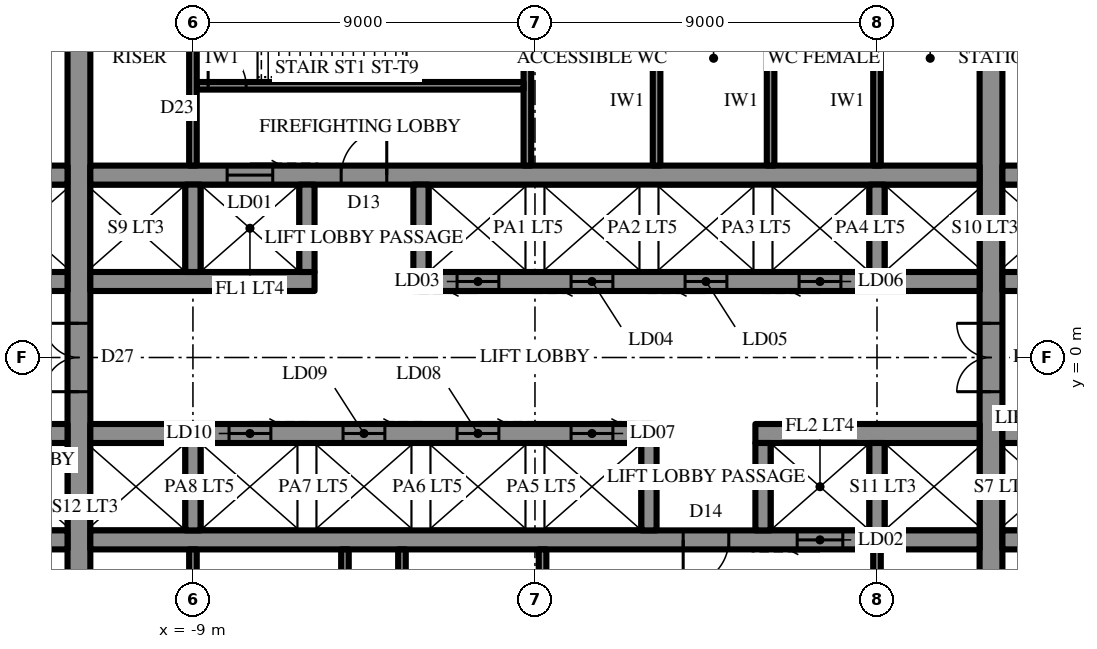
"""IFC4 building model, lengths in metres.
Left out: names, types, materials, properties, quantities, classifications, styles, units other than length and angle.
Written with IfcOpenShell. Run it as: python <this file> out.ifc"""

import sys

from ifc_helpers import new_model, si_unit, direction, frame, frame_2d, origin, place, context, subcontext, project, spatial, rectangle, extrude, element, fill, save


model = new_model("IFC4")
c1 = context("Model", 3, precision=1e-05, world=origin(), true_north=direction((0.0, 1.0)))
c2 = subcontext(c1, "Body", "Model", "MODEL_VIEW")
j1 = project(units=[si_unit("LENGTHUNIT", "METRE"), si_unit("PLANEANGLEUNIT", "RADIAN")], contexts=[c1])
p1 = place(None, origin())
s1 = spatial("IfcSite", under=j1, at=p1, CompositionType="ELEMENT")
p2 = place(p1, origin())
s2 = spatial("IfcBuilding", under=s1, at=p2, CompositionType="ELEMENT")
p3 = place(p2, frame((0.0, 0.0, 18.5)))
s3 = spatial("IfcBuildingStorey", under=s2, at=p3, CompositionType="ELEMENT", Elevation=18.5)
p4 = place(p3, frame((12.0, -10.7, 0.0), z_axis=(0.0, 0.0, 1.0), x_axis=(0.0, 1.0, 0.0)))
e1 = element("IfcWall", 1, at=p4, inside=s3, PredefinedType="SHEAR", context=c2, shape_type="SweptSolid", body=[
    extrude(rectangle(XDim=21.4, YDim=0.6, at=frame_2d((10.7, 0.0))), origin(), (0.0, 0.0, 1.0), 5.0),
])
p5 = place(p4, frame((9.8, 0.0, 0.0)))
e2 = element("IfcOpeningElement", 2, at=p5, cuts=e1, PredefinedType="OPENING", context=c2, shape_type="SweptSolid", body=[
    extrude(rectangle(XDim=1.8, YDim=2.4, at=frame_2d((0.9, 1.2))), frame((0.0, 0.31, 0.0), z_axis=(0.0, -1.0, 0.0), x_axis=(1.0, 0.0, 0.0)), (0.0, 0.0, 1.0), 0.62),
])
p6 = place(p3, frame((-12.0, -10.7, 0.0), z_axis=(0.0, 0.0, 1.0), x_axis=(0.0, 1.0, 0.0)))
e3 = element("IfcWall", 3, at=p6, inside=s3, PredefinedType="SHEAR", context=c2, shape_type="SweptSolid", body=[
    extrude(rectangle(XDim=21.4, YDim=0.6, at=frame_2d((10.7, 0.0))), origin(), (0.0, 0.0, 1.0), 5.0),
])
p7 = place(p6, frame((9.8, 0.0, 0.0)))
e4 = element("IfcOpeningElement", 4, at=p7, cuts=e3, PredefinedType="OPENING", context=c2, shape_type="SweptSolid", body=[
    extrude(rectangle(XDim=1.8, YDim=2.4, at=frame_2d((0.9, 1.2))), frame((0.0, 0.31, 0.0), z_axis=(0.0, -1.0, 0.0), x_axis=(1.0, 0.0, 0.0)), (0.0, 0.0, 1.0), 0.62),
])
p8 = place(p3, frame((-14.8, 2.0, 0.0), z_axis=(0.0, 0.0, 1.0), x_axis=(1.0, 0.0, 0.0)))
e5 = element("IfcWall", 5, at=p8, inside=s3, PredefinedType="SHEAR", context=c2, shape_type="SweptSolid", body=[
    extrude(rectangle(XDim=2.5, YDim=0.5, at=frame_2d((1.25, 0.0))), origin(), (0.0, 0.0, 1.0), 5.0),
])
p9 = place(p3, frame((-11.7, 2.0, 0.0), z_axis=(0.0, 0.0, 1.0), x_axis=(1.0, 0.0, 0.0)))
e6 = element("IfcWall", 6, at=p9, inside=s3, PredefinedType="SHEAR", context=c2, shape_type="SweptSolid", body=[
    extrude(rectangle(XDim=5.9, YDim=0.5, at=frame_2d((2.95, 0.0))), origin(), (0.0, 0.0, 1.0), 5.0),
])
p10 = place(p3, frame((-3.2, 2.0, 0.0), z_axis=(0.0, 0.0, 1.0), x_axis=(1.0, 0.0, 0.0)))
e7 = element("IfcWall", 7, at=p10, inside=s3, PredefinedType="SHEAR", context=c2, shape_type="SweptSolid", body=[
    extrude(rectangle(XDim=14.9, YDim=0.5, at=frame_2d((7.45, 0.0))), origin(), (0.0, 0.0, 1.0), 5.0),
])
p11 = place(p10, frame((1.15, 0.0, 0.0)))
e8 = element("IfcOpeningElement", 8, at=p11, cuts=e7, PredefinedType="OPENING", context=c2, shape_type="SweptSolid", body=[
    extrude(rectangle(XDim=1.1, YDim=2.2, at=frame_2d((0.55, 1.1))), frame((0.0, 0.26, 0.0), z_axis=(0.0, -1.0, 0.0), x_axis=(1.0, 0.0, 0.0)), (0.0, 0.0, 1.0), 0.52),
])
p12 = place(p10, frame((4.15, 0.0, 0.0)))
e9 = element("IfcOpeningElement", 9, at=p12, cuts=e7, PredefinedType="OPENING", context=c2, shape_type="SweptSolid", body=[
    extrude(rectangle(XDim=1.1, YDim=2.2, at=frame_2d((0.55, 1.1))), frame((0.0, 0.26, 0.0), z_axis=(0.0, -1.0, 0.0), x_axis=(1.0, 0.0, 0.0)), (0.0, 0.0, 1.0), 0.52),
])
p13 = place(p10, frame((7.15, 0.0, 0.0)))
e10 = element("IfcOpeningElement", 10, at=p13, cuts=e7, PredefinedType="OPENING", context=c2, shape_type="SweptSolid", body=[
    extrude(rectangle(XDim=1.1, YDim=2.2, at=frame_2d((0.55, 1.1))), frame((0.0, 0.26, 0.0), z_axis=(0.0, -1.0, 0.0), x_axis=(1.0, 0.0, 0.0)), (0.0, 0.0, 1.0), 0.52),
])
p14 = place(p10, frame((10.15, 0.0, 0.0)))
e11 = element("IfcOpeningElement", 11, at=p14, cuts=e7, PredefinedType="OPENING", context=c2, shape_type="SweptSolid", body=[
    extrude(rectangle(XDim=1.1, YDim=2.2, at=frame_2d((0.55, 1.1))), frame((0.0, 0.26, 0.0), z_axis=(0.0, -1.0, 0.0), x_axis=(1.0, 0.0, 0.0)), (0.0, 0.0, 1.0), 0.52),
])
for number, where, z_axis, x_axis in (
    (12, (12.3, 2.0, 0.0), (0.0, 0.0, 1.0), (1.0, 0.0, 0.0)),
    (13, (-14.8, 4.8, 0.0), (0.0, 0.0, 1.0), (1.0, 0.0, 0.0)),
):
    element("IfcWall", number, at=place(p3, frame(where, z_axis=z_axis, x_axis=x_axis)), inside=s3, PredefinedType="SHEAR", context=c2, shape_type="SweptSolid", body=[
        extrude(rectangle(XDim=2.5, YDim=0.5, at=frame_2d((1.25, 0.0))), origin(), (0.0, 0.0, 1.0), 5.0),
    ])
p15 = place(p3, frame((-11.7, 4.8, 0.0), z_axis=(0.0, 0.0, 1.0), x_axis=(1.0, 0.0, 0.0)))
e14 = element("IfcWall", 14, at=p15, inside=s3, PredefinedType="SHEAR", context=c2, shape_type="SweptSolid", body=[
    extrude(rectangle(XDim=23.4, YDim=0.5, at=frame_2d((11.7, 0.0))), origin(), (0.0, 0.0, 1.0), 5.0),
])
p16 = place(p15, frame((6.6, 0.0, 0.0)))
e15 = element("IfcOpeningElement", 15, at=p16, cuts=e14, PredefinedType="OPENING", context=c2, shape_type="SweptSolid", body=[
    extrude(rectangle(XDim=1.2, YDim=2.2, at=frame_2d((0.6, 1.1))), frame((0.0, 0.26, 0.0), z_axis=(0.0, -1.0, 0.0), x_axis=(1.0, 0.0, 0.0)), (0.0, 0.0, 1.0), 0.52),
])
p17 = place(p15, frame((3.6, 0.0, 0.0)))
e16 = element("IfcOpeningElement", 16, at=p17, cuts=e14, PredefinedType="OPENING", context=c2, shape_type="SweptSolid", body=[
    extrude(rectangle(XDim=1.2, YDim=2.2, at=frame_2d((0.6, 1.1))), frame((0.0, 0.26, 0.0), z_axis=(0.0, -1.0, 0.0), x_axis=(1.0, 0.0, 0.0)), (0.0, 0.0, 1.0), 0.52),
])
p18 = place(p3, frame((12.3, 4.8, 0.0), z_axis=(0.0, 0.0, 1.0), x_axis=(1.0, 0.0, 0.0)))
e17 = element("IfcWall", 17, at=p18, inside=s3, PredefinedType="SHEAR", context=c2, shape_type="SweptSolid", body=[
    extrude(rectangle(XDim=2.5, YDim=0.5, at=frame_2d((1.25, 0.0))), origin(), (0.0, 0.0, 1.0), 5.0),
])
for number, where, z_axis, x_axis in (
    (18, (-9.0, 2.25, 0.0), (0.0, 0.0, 1.0), (0.0, 1.0, 0.0)),
    (19, (-6.0, 2.25, 0.0), (0.0, 0.0, 1.0), (0.0, 1.0, 0.0)),
    (20, (-3.0, 2.25, 0.0), (0.0, 0.0, 1.0), (0.0, 1.0, 0.0)),
    (21, (9.0, 2.25, 0.0), (0.0, 0.0, 1.0), (0.0, 1.0, 0.0)),
):
    element("IfcWall", number, at=place(p3, frame(where, z_axis=z_axis, x_axis=x_axis)), inside=s3, PredefinedType="SHEAR", context=c2, shape_type="SweptSolid", body=[
        extrude(rectangle(XDim=2.3, YDim=0.4, at=frame_2d((1.15, 0.0))), origin(), (0.0, 0.0, 1.0), 5.0),
    ])
p19 = place(p3, frame((-0.2, 5.05, 0.0), z_axis=(0.0, 0.0, 1.0), x_axis=(0.0, 1.0, 0.0)))
e22 = element("IfcWall", 22, at=p19, inside=s3, PredefinedType="SHEAR", context=c2, shape_type="SweptSolid", body=[
    extrude(rectangle(XDim=5.65, YDim=0.2, at=frame_2d((2.825, 0.0))), origin(), (0.0, 0.0, 1.0), 5.0),
])
p20 = place(p3, frame((-8.9, 7.15, 0.0), z_axis=(0.0, 0.0, 1.0), x_axis=(1.0, 0.0, 0.0)))
e23 = element("IfcWall", 23, at=p20, inside=s3, PredefinedType="SHEAR", context=c2, shape_type="SweptSolid", body=[
    extrude(rectangle(XDim=8.6, YDim=0.2, at=frame_2d((4.3, 0.0))), origin(), (0.0, 0.0, 1.0), 5.0),
])
p21 = place(p20, frame((0.3, 0.0, 0.0)))
e24 = element("IfcOpeningElement", 24, at=p21, cuts=e23, PredefinedType="OPENING", context=c2, shape_type="SweptSolid", body=[
    extrude(rectangle(XDim=1.0, YDim=2.2, at=frame_2d((0.5, 1.1))), frame((0.0, 0.11, 0.0), z_axis=(0.0, -1.0, 0.0), x_axis=(1.0, 0.0, 0.0)), (0.0, 0.0, 1.0), 0.22),
])
p22 = place(p3, frame((14.8, -2.0, 0.0), z_axis=(0.0, 0.0, 1.0), x_axis=(-1.0, 0.0, 0.0)))
e25 = element("IfcWall", 25, at=p22, inside=s3, PredefinedType="SHEAR", context=c2, shape_type="SweptSolid", body=[
    extrude(rectangle(XDim=2.5, YDim=0.5, at=frame_2d((1.25, 0.0))), origin(), (0.0, 0.0, 1.0), 5.0),
])
p23 = place(p3, frame((11.7, -2.0, 0.0), z_axis=(0.0, 0.0, 1.0), x_axis=(-1.0, 0.0, 0.0)))
e26 = element("IfcWall", 26, at=p23, inside=s3, PredefinedType="SHEAR", context=c2, shape_type="SweptSolid", body=[
    extrude(rectangle(XDim=5.9, YDim=0.5, at=frame_2d((2.95, 0.0))), origin(), (0.0, 0.0, 1.0), 5.0),
])
p24 = place(p3, frame((3.2, -2.0, 0.0), z_axis=(0.0, 0.0, 1.0), x_axis=(-1.0, 0.0, 0.0)))
e27 = element("IfcWall", 27, at=p24, inside=s3, PredefinedType="SHEAR", context=c2, shape_type="SweptSolid", body=[
    extrude(rectangle(XDim=14.9, YDim=0.5, at=frame_2d((7.45, 0.0))), origin(), (0.0, 0.0, 1.0), 5.0),
])
p25 = place(p24, frame((1.15, 0.0, 0.0)))
e28 = element("IfcOpeningElement", 28, at=p25, cuts=e27, PredefinedType="OPENING", context=c2, shape_type="SweptSolid", body=[
    extrude(rectangle(XDim=1.1, YDim=2.2, at=frame_2d((0.55, 1.1))), frame((0.0, 0.26, 0.0), z_axis=(0.0, -1.0, 0.0), x_axis=(1.0, 0.0, 0.0)), (0.0, 0.0, 1.0), 0.52),
])
p26 = place(p24, frame((4.15, 0.0, 0.0)))
e29 = element("IfcOpeningElement", 29, at=p26, cuts=e27, PredefinedType="OPENING", context=c2, shape_type="SweptSolid", body=[
    extrude(rectangle(XDim=1.1, YDim=2.2, at=frame_2d((0.55, 1.1))), frame((0.0, 0.26, 0.0), z_axis=(0.0, -1.0, 0.0), x_axis=(1.0, 0.0, 0.0)), (0.0, 0.0, 1.0), 0.52),
])
p27 = place(p24, frame((7.15, 0.0, 0.0)))
e30 = element("IfcOpeningElement", 30, at=p27, cuts=e27, PredefinedType="OPENING", context=c2, shape_type="SweptSolid", body=[
    extrude(rectangle(XDim=1.1, YDim=2.2, at=frame_2d((0.55, 1.1))), frame((0.0, 0.26, 0.0), z_axis=(0.0, -1.0, 0.0), x_axis=(1.0, 0.0, 0.0)), (0.0, 0.0, 1.0), 0.52),
])
p28 = place(p24, frame((10.15, 0.0, 0.0)))
e31 = element("IfcOpeningElement", 31, at=p28, cuts=e27, PredefinedType="OPENING", context=c2, shape_type="SweptSolid", body=[
    extrude(rectangle(XDim=1.1, YDim=2.2, at=frame_2d((0.55, 1.1))), frame((0.0, 0.26, 0.0), z_axis=(0.0, -1.0, 0.0), x_axis=(1.0, 0.0, 0.0)), (0.0, 0.0, 1.0), 0.52),
])
for number, where, z_axis, x_axis in (
    (32, (-12.3, -2.0, 0.0), (0.0, 0.0, 1.0), (-1.0, 0.0, 0.0)),
    (33, (14.8, -4.8, 0.0), (0.0, 0.0, 1.0), (-1.0, 0.0, 0.0)),
):
    element("IfcWall", number, at=place(p3, frame(where, z_axis=z_axis, x_axis=x_axis)), inside=s3, PredefinedType="SHEAR", context=c2, shape_type="SweptSolid", body=[
        extrude(rectangle(XDim=2.5, YDim=0.5, at=frame_2d((1.25, 0.0))), origin(), (0.0, 0.0, 1.0), 5.0),
    ])
p29 = place(p3, frame((11.7, -4.8, 0.0), z_axis=(0.0, 0.0, 1.0), x_axis=(-1.0, 0.0, 0.0)))
e34 = element("IfcWall", 34, at=p29, inside=s3, PredefinedType="SHEAR", context=c2, shape_type="SweptSolid", body=[
    extrude(rectangle(XDim=23.4, YDim=0.5, at=frame_2d((11.7, 0.0))), origin(), (0.0, 0.0, 1.0), 5.0),
])
p30 = place(p29, frame((6.6, 0.0, 0.0)))
e35 = element("IfcOpeningElement", 35, at=p30, cuts=e34, PredefinedType="OPENING", context=c2, shape_type="SweptSolid", body=[
    extrude(rectangle(XDim=1.2, YDim=2.2, at=frame_2d((0.6, 1.1))), frame((0.0, 0.26, 0.0), z_axis=(0.0, -1.0, 0.0), x_axis=(1.0, 0.0, 0.0)), (0.0, 0.0, 1.0), 0.52),
])
p31 = place(p29, frame((3.6, 0.0, 0.0)))
e36 = element("IfcOpeningElement", 36, at=p31, cuts=e34, PredefinedType="OPENING", context=c2, shape_type="SweptSolid", body=[
    extrude(rectangle(XDim=1.2, YDim=2.2, at=frame_2d((0.6, 1.1))), frame((0.0, 0.26, 0.0), z_axis=(0.0, -1.0, 0.0), x_axis=(1.0, 0.0, 0.0)), (0.0, 0.0, 1.0), 0.52),
])
p32 = place(p3, frame((-12.3, -4.8, 0.0), z_axis=(0.0, 0.0, 1.0), x_axis=(-1.0, 0.0, 0.0)))
e37 = element("IfcWall", 37, at=p32, inside=s3, PredefinedType="SHEAR", context=c2, shape_type="SweptSolid", body=[
    extrude(rectangle(XDim=2.5, YDim=0.5, at=frame_2d((1.25, 0.0))), origin(), (0.0, 0.0, 1.0), 5.0),
])
for number, where, z_axis, x_axis in (
    (38, (9.0, -2.25, 0.0), (0.0, 0.0, 1.0), (0.0, -1.0, 0.0)),
    (39, (6.0, -2.25, 0.0), (0.0, 0.0, 1.0), (0.0, -1.0, 0.0)),
    (40, (3.0, -2.25, 0.0), (0.0, 0.0, 1.0), (0.0, -1.0, 0.0)),
    (41, (-9.0, -2.25, 0.0), (0.0, 0.0, 1.0), (0.0, -1.0, 0.0)),
):
    element("IfcWall", number, at=place(p3, frame(where, z_axis=z_axis, x_axis=x_axis)), inside=s3, PredefinedType="SHEAR", context=c2, shape_type="SweptSolid", body=[
        extrude(rectangle(XDim=2.3, YDim=0.4, at=frame_2d((1.15, 0.0))), origin(), (0.0, 0.0, 1.0), 5.0),
    ])
p33 = place(p3, frame((0.2, -5.05, 0.0), z_axis=(0.0, 0.0, 1.0), x_axis=(0.0, -1.0, 0.0)))
e42 = element("IfcWall", 42, at=p33, inside=s3, PredefinedType="SHEAR", context=c2, shape_type="SweptSolid", body=[
    extrude(rectangle(XDim=5.65, YDim=0.2, at=frame_2d((2.825, 0.0))), origin(), (0.0, 0.0, 1.0), 5.0),
])
for number, where, z_axis, x_axis in (
    (43, (-9.0, 5.05, 0.0), (0.0, 0.0, 1.0), (0.0, 1.0, 0.0)),
    (44, (9.0, 5.05, 0.0), (0.0, 0.0, 1.0), (0.0, 1.0, 0.0)),
    (45, (3.2, 5.05, 0.0), (0.0, 0.0, 1.0), (0.0, 1.0, 0.0)),
    (46, (6.2, 5.05, 0.0), (0.0, 0.0, 1.0), (0.0, 1.0, 0.0)),
    (47, (9.0, -5.05, 0.0), (0.0, 0.0, 1.0), (0.0, -1.0, 0.0)),
    (48, (-9.0, -5.05, 0.0), (0.0, 0.0, 1.0), (0.0, -1.0, 0.0)),
    (49, (-3.5, -5.05, 0.0), (0.0, 0.0, 1.0), (0.0, -1.0, 0.0)),
    (50, (-5.0, -5.05, 0.0), (0.0, 0.0, 1.0), (0.0, -1.0, 0.0)),
):
    element("IfcWall", number, at=place(p3, frame(where, z_axis=z_axis, x_axis=x_axis)), inside=s3, PredefinedType="PARTITIONING", context=c2, shape_type="SweptSolid", body=[
        extrude(rectangle(XDim=5.65, YDim=0.2, at=frame_2d((2.825, 0.0))), origin(), (0.0, 0.0, 1.0), 4.65),
    ])
p34 = place(p16, origin())
e51 = element("IfcDoor", 51, at=p34, inside=s3, OperationType="SINGLE_SWING_LEFT", PredefinedType="DOOR", context=c2, shape_type="SweptSolid", body=[
    extrude(rectangle(XDim=1.2, YDim=2.2, at=frame_2d((0.6, 1.1))), frame((0.0, 0.025, 0.0), z_axis=(0.0, -1.0, 0.0), x_axis=(1.0, 0.0, 0.0)), (0.0, 0.0, 1.0), 0.05),
])
fill(e15, e51)
p35 = place(p21, origin())
e52 = element("IfcDoor", 52, at=p35, inside=s3, OperationType="SINGLE_SWING_RIGHT", PredefinedType="DOOR", context=c2, shape_type="SweptSolid", body=[
    extrude(rectangle(XDim=1.0, YDim=2.2, at=frame_2d((0.5, 1.1))), frame((0.0, 0.025, 0.0), z_axis=(0.0, -1.0, 0.0), x_axis=(1.0, 0.0, 0.0)), (0.0, 0.0, 1.0), 0.05),
])
fill(e24, e52)
p36 = place(p30, origin())
e53 = element("IfcDoor", 53, at=p36, inside=s3, OperationType="SINGLE_SWING_LEFT", PredefinedType="DOOR", context=c2, shape_type="SweptSolid", body=[
    extrude(rectangle(XDim=1.2, YDim=2.2, at=frame_2d((0.6, 1.1))), frame((0.0, 0.025, 0.0), z_axis=(0.0, -1.0, 0.0), x_axis=(1.0, 0.0, 0.0)), (0.0, 0.0, 1.0), 0.05),
])
fill(e35, e53)
p37 = place(p5, origin())
e54 = element("IfcDoor", 54, at=p37, inside=s3, OperationType="DOUBLE_DOOR_SINGLE_SWING", PredefinedType="DOOR", context=c2, shape_type="SweptSolid", body=[
    extrude(rectangle(XDim=1.8, YDim=2.4, at=frame_2d((0.9, 1.2))), frame((0.0, 0.025, 0.0), z_axis=(0.0, -1.0, 0.0), x_axis=(1.0, 0.0, 0.0)), (0.0, 0.0, 1.0), 0.05),
])
fill(e2, e54)
p38 = place(p7, origin())
e55 = element("IfcDoor", 55, at=p38, inside=s3, OperationType="DOUBLE_DOOR_SINGLE_SWING", PredefinedType="DOOR", context=c2, shape_type="SweptSolid", body=[
    extrude(rectangle(XDim=1.8, YDim=2.4, at=frame_2d((0.9, 1.2))), frame((0.0, 0.025, 0.0), z_axis=(0.0, -1.0, 0.0), x_axis=(1.0, 0.0, 0.0)), (0.0, 0.0, 1.0), 0.05),
])
fill(e4, e55)
p39 = place(p17, origin())
e56 = element("IfcDoor", 56, at=p39, inside=s3, OperationType="SLIDING_TO_LEFT", PredefinedType="DOOR", context=c2, shape_type="SweptSolid", body=[
    extrude(rectangle(XDim=1.2, YDim=2.2, at=frame_2d((0.6, 1.1))), frame((0.0, 0.025, 0.0), z_axis=(0.0, -1.0, 0.0), x_axis=(1.0, 0.0, 0.0)), (0.0, 0.0, 1.0), 0.05),
])
fill(e16, e56)
p40 = place(p11, frame((1.1, 0.0, 0.0), z_axis=(0.0, 0.0, 1.0), x_axis=(-1.0, 0.0, 0.0)))
e57 = element("IfcDoor", 57, at=p40, inside=s3, OperationType="SLIDING_TO_LEFT", PredefinedType="DOOR", context=c2, shape_type="SweptSolid", body=[
    extrude(rectangle(XDim=1.1, YDim=2.2, at=frame_2d((0.55, 1.1))), frame((0.0, 0.025, 0.0), z_axis=(0.0, -1.0, 0.0), x_axis=(1.0, 0.0, 0.0)), (0.0, 0.0, 1.0), 0.05),
])
fill(e8, e57)
p41 = place(p12, frame((1.1, 0.0, 0.0), z_axis=(0.0, 0.0, 1.0), x_axis=(-1.0, 0.0, 0.0)))
e58 = element("IfcDoor", 58, at=p41, inside=s3, OperationType="SLIDING_TO_LEFT", PredefinedType="DOOR", context=c2, shape_type="SweptSolid", body=[
    extrude(rectangle(XDim=1.1, YDim=2.2, at=frame_2d((0.55, 1.1))), frame((0.0, 0.025, 0.0), z_axis=(0.0, -1.0, 0.0), x_axis=(1.0, 0.0, 0.0)), (0.0, 0.0, 1.0), 0.05),
])
fill(e9, e58)
p42 = place(p13, frame((1.1, 0.0, 0.0), z_axis=(0.0, 0.0, 1.0), x_axis=(-1.0, 0.0, 0.0)))
e59 = element("IfcDoor", 59, at=p42, inside=s3, OperationType="SLIDING_TO_LEFT", PredefinedType="DOOR", context=c2, shape_type="SweptSolid", body=[
    extrude(rectangle(XDim=1.1, YDim=2.2, at=frame_2d((0.55, 1.1))), frame((0.0, 0.025, 0.0), z_axis=(0.0, -1.0, 0.0), x_axis=(1.0, 0.0, 0.0)), (0.0, 0.0, 1.0), 0.05),
])
fill(e10, e59)
p43 = place(p14, frame((1.1, 0.0, 0.0), z_axis=(0.0, 0.0, 1.0), x_axis=(-1.0, 0.0, 0.0)))
e60 = element("IfcDoor", 60, at=p43, inside=s3, OperationType="SLIDING_TO_LEFT", PredefinedType="DOOR", context=c2, shape_type="SweptSolid", body=[
    extrude(rectangle(XDim=1.1, YDim=2.2, at=frame_2d((0.55, 1.1))), frame((0.0, 0.025, 0.0), z_axis=(0.0, -1.0, 0.0), x_axis=(1.0, 0.0, 0.0)), (0.0, 0.0, 1.0), 0.05),
])
fill(e11, e60)
p44 = place(p31, origin())
e61 = element("IfcDoor", 61, at=p44, inside=s3, OperationType="SLIDING_TO_LEFT", PredefinedType="DOOR", context=c2, shape_type="SweptSolid", body=[
    extrude(rectangle(XDim=1.2, YDim=2.2, at=frame_2d((0.6, 1.1))), frame((0.0, 0.025, 0.0), z_axis=(0.0, -1.0, 0.0), x_axis=(1.0, 0.0, 0.0)), (0.0, 0.0, 1.0), 0.05),
])
fill(e36, e61)
p45 = place(p25, frame((1.1, 0.0, 0.0), z_axis=(0.0, 0.0, 1.0), x_axis=(-1.0, 0.0, 0.0)))
e62 = element("IfcDoor", 62, at=p45, inside=s3, OperationType="SLIDING_TO_LEFT", PredefinedType="DOOR", context=c2, shape_type="SweptSolid", body=[
    extrude(rectangle(XDim=1.1, YDim=2.2, at=frame_2d((0.55, 1.1))), frame((0.0, 0.025, 0.0), z_axis=(0.0, -1.0, 0.0), x_axis=(1.0, 0.0, 0.0)), (0.0, 0.0, 1.0), 0.05),
])
fill(e28, e62)
p46 = place(p26, frame((1.1, 0.0, 0.0), z_axis=(0.0, 0.0, 1.0), x_axis=(-1.0, 0.0, 0.0)))
e63 = element("IfcDoor", 63, at=p46, inside=s3, OperationType="SLIDING_TO_LEFT", PredefinedType="DOOR", context=c2, shape_type="SweptSolid", body=[
    extrude(rectangle(XDim=1.1, YDim=2.2, at=frame_2d((0.55, 1.1))), frame((0.0, 0.025, 0.0), z_axis=(0.0, -1.0, 0.0), x_axis=(1.0, 0.0, 0.0)), (0.0, 0.0, 1.0), 0.05),
])
fill(e29, e63)
p47 = place(p27, frame((1.1, 0.0, 0.0), z_axis=(0.0, 0.0, 1.0), x_axis=(-1.0, 0.0, 0.0)))
e64 = element("IfcDoor", 64, at=p47, inside=s3, OperationType="SLIDING_TO_LEFT", PredefinedType="DOOR", context=c2, shape_type="SweptSolid", body=[
    extrude(rectangle(XDim=1.1, YDim=2.2, at=frame_2d((0.55, 1.1))), frame((0.0, 0.025, 0.0), z_axis=(0.0, -1.0, 0.0), x_axis=(1.0, 0.0, 0.0)), (0.0, 0.0, 1.0), 0.05),
])
fill(e30, e64)
p48 = place(p28, frame((1.1, 0.0, 0.0), z_axis=(0.0, 0.0, 1.0), x_axis=(-1.0, 0.0, 0.0)))
e65 = element("IfcDoor", 65, at=p48, inside=s3, OperationType="SLIDING_TO_LEFT", PredefinedType="DOOR", context=c2, shape_type="SweptSolid", body=[
    extrude(rectangle(XDim=1.1, YDim=2.2, at=frame_2d((0.55, 1.1))), frame((0.0, 0.025, 0.0), z_axis=(0.0, -1.0, 0.0), x_axis=(1.0, 0.0, 0.0)), (0.0, 0.0, 1.0), 0.05),
])
fill(e31, e65)
save(model, sys.argv[1])
